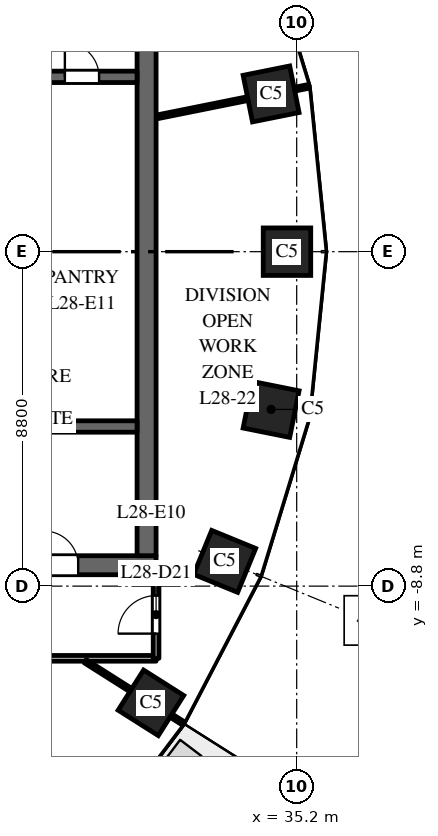
"""IFC4 building model, lengths in metres.
Left out: names, types, materials, properties, quantities, classifications, styles, units other than length and angle.
Written with IfcOpenShell. Run it as: python <this file> out.ifc"""

import sys

from ifc_helpers import new_model, si_unit, direction, frame, frame_2d, origin, origin_2d, place, context, subcontext, project, spatial, rectangle, extrude, element, fill, save


model = new_model("IFC4")
c1 = context("Model", 3, precision=1e-05, world=origin(), true_north=direction((0.0, 1.0)))
c2 = subcontext(c1, "Body", "Model", "MODEL_VIEW")
j1 = project(units=[si_unit("LENGTHUNIT", "METRE"), si_unit("PLANEANGLEUNIT", "RADIAN")], contexts=[c1])
p1 = place(None, origin())
s1 = spatial("IfcSite", under=j1, at=p1, CompositionType="ELEMENT")
p2 = place(p1, origin())
s2 = spatial("IfcBuilding", under=s1, at=p2, CompositionType="ELEMENT")
p3 = place(p2, frame((0.0, 0.0, 124.0)))
s3 = spatial("IfcBuildingStorey", under=s2, at=p3, CompositionType="ELEMENT", Elevation=124.0)
for number, where, z_axis, x_axis in (
    (1, (34.945, 0.0, 0.0), (0.0, 0.0, 1.0), (0.0, 1.0, 0.0)),
    (2, (34.527, 4.151, 0.0), (0.0, 0.0, 1.0), (-0.197, 0.98, 0.0)),
    (3, (31.365, -11.871, 0.0), (0.0, 0.0, 1.0), (0.535, 0.845, 0.0)),
    (4, (33.305, -8.149, 0.0), (0.0, 0.0, 1.0), (0.379, 0.925, 0.0)),
    (5, (34.527, -4.151, 0.0), (0.0, 0.0, 1.0), (0.197, 0.98, 0.0)),
):
    element("IfcColumn", number, at=place(p3, frame(where, z_axis=z_axis, x_axis=x_axis)), inside=s3, PredefinedType="COLUMN", context=c2, shape_type="SweptSolid", body=[
        extrude(rectangle(XDim=1.25, YDim=1.25, at=origin_2d()), origin(), (0.0, 0.0, 1.0), 4.0),
    ])
p4 = place(p3, frame((16.5, -8.25, 0.0), z_axis=(0.0, 0.0, 1.0), x_axis=(1.0, 0.0, 0.0)))
e6 = element("IfcWall", 6, at=p4, inside=s3, PredefinedType="SHEAR", context=c2, shape_type="SweptSolid", body=[
    extrude(rectangle(XDim=15.0, YDim=0.5, at=frame_2d((7.5, 0.0))), origin(), (0.0, 0.0, 1.0), 3.7),
])
p5 = place(p4, frame((6.9, 0.0, 0.0)))
e7 = element("IfcOpeningElement", 7, at=p5, cuts=e6, PredefinedType="OPENING", context=c2, shape_type="SweptSolid", body=[
    extrude(rectangle(XDim=1.2, YDim=2.1, at=frame_2d((0.6, 1.05))), frame((0.0, 0.26, 0.0), z_axis=(0.0, -1.0, 0.0), x_axis=(1.0, 0.0, 0.0)), (0.0, 0.0, 1.0), 0.52),
])
p6 = place(p4, frame((12.05, 0.0, 0.0)))
e8 = element("IfcOpeningElement", 8, at=p6, cuts=e6, PredefinedType="OPENING", context=c2, shape_type="SweptSolid", body=[
    extrude(rectangle(XDim=0.9, YDim=2.1, at=frame_2d((0.45, 1.05))), frame((0.0, 0.26, 0.0), z_axis=(0.0, -1.0, 0.0), x_axis=(1.0, 0.0, 0.0)), (0.0, 0.0, 1.0), 0.52),
])
p7 = place(p3, frame((31.25, -8.0, 0.0), z_axis=(0.0, 0.0, 1.0), x_axis=(0.0, 1.0, 0.0)))
e9 = element("IfcWall", 9, at=p7, inside=s3, PredefinedType="SHEAR", context=c2, shape_type="SweptSolid", body=[
    extrude(rectangle(XDim=16.0, YDim=0.5, at=frame_2d((8.0, 0.0))), origin(), (0.0, 0.0, 1.0), 3.7),
])
p8 = place(p3, frame((24.9, 4.6, 0.0), z_axis=(0.0, 0.0, 1.0), x_axis=(1.0, 0.0, 0.0)))
e10 = element("IfcWall", 10, at=p8, inside=s3, PredefinedType="SHEAR", context=c2, shape_type="SweptSolid", body=[
    extrude(rectangle(XDim=6.1, YDim=0.3, at=frame_2d((3.05, 0.0))), origin(), (0.0, 0.0, 1.0), 3.7),
])
p9 = place(p8, frame((4.2, 0.0, 0.0)))
e11 = element("IfcOpeningElement", 11, at=p9, cuts=e10, PredefinedType="OPENING", context=c2, shape_type="SweptSolid", body=[
    extrude(rectangle(XDim=0.9, YDim=2.1, at=frame_2d((0.45, 1.05))), frame((0.0, 0.16, 0.0), z_axis=(0.0, -1.0, 0.0), x_axis=(1.0, 0.0, 0.0)), (0.0, 0.0, 1.0), 0.32),
])
p10 = place(p3, frame((24.9, -4.6, 0.0), z_axis=(0.0, 0.0, 1.0), x_axis=(1.0, 0.0, 0.0)))
e12 = element("IfcWall", 12, at=p10, inside=s3, PredefinedType="SHEAR", context=c2, shape_type="SweptSolid", body=[
    extrude(rectangle(XDim=6.1, YDim=0.3, at=frame_2d((3.05, 0.0))), origin(), (0.0, 0.0, 1.0), 3.7),
])
p11 = place(p3, frame((16.5, -10.7, 0.0), z_axis=(0.0, 0.0, 1.0), x_axis=(1.0, 0.0, 0.0)))
e13 = element("IfcWall", 13, at=p11, inside=s3, PredefinedType="PARTITIONING", context=c2, shape_type="SweptSolid", body=[
    extrude(rectangle(XDim=15.0, YDim=0.15, at=frame_2d((7.5, 0.0))), origin(), (0.0, 0.0, 1.0), 2.75),
])
p12 = place(p11, frame((8.65, 0.0, 0.0)))
e14 = element("IfcOpeningElement", 14, at=p12, cuts=e13, PredefinedType="OPENING", context=c2, shape_type="SweptSolid", body=[
    extrude(rectangle(XDim=1.0, YDim=2.1, at=frame_2d((0.5, 1.05))), frame((0.0, 0.085, 0.0), z_axis=(0.0, -1.0, 0.0), x_axis=(1.0, 0.0, 0.0)), (0.0, 0.0, 1.0), 0.17),
])
p13 = place(p3, frame((29.637, -10.777, 0.0), z_axis=(0.0, 0.0, 1.0), x_axis=(0.844810627195, -0.535065420467, 0.0)))
e15 = element("IfcWall", 15, at=p13, inside=s3, PredefinedType="PARTITIONING", context=c2, shape_type="SweptSolid", body=[
    extrude(rectangle(XDim=3.048, YDim=0.1, at=frame_2d((1.524, 0.0))), origin(), (0.0, 0.0, 1.0), 2.9),
])
p14 = place(p3, frame((31.5, -10.7, 0.0), z_axis=(0.0, 0.0, 1.0), x_axis=(0.0, 1.0, 0.0)))
e16 = element("IfcWall", 16, at=p14, inside=s3, PredefinedType="PARTITIONING", context=c2, shape_type="SweptSolid", body=[
    extrude(rectangle(XDim=2.2, YDim=0.15, at=frame_2d((1.1, 0.0))), origin(), (0.0, 0.0, 1.0), 2.9),
])
p15 = place(p14, frame((0.65, 0.0, 0.0)))
e17 = element("IfcOpeningElement", 17, at=p15, cuts=e16, PredefinedType="OPENING", context=c2, shape_type="SweptSolid", body=[
    extrude(rectangle(XDim=1.0, YDim=2.1, at=frame_2d((0.5, 1.05))), frame((0.0, 0.085, 0.0), z_axis=(0.0, -1.0, 0.0), x_axis=(1.0, 0.0, 0.0)), (0.0, 0.0, 1.0), 0.17),
])
p16 = place(p3, frame((31.5, 3.542, 0.0), z_axis=(0.0, 0.0, 1.0), x_axis=(0.980357474535, 0.197228857227, 0.0)))
e18 = element("IfcWall", 18, at=p16, inside=s3, PredefinedType="PARTITIONING", context=c2, shape_type="SweptSolid", body=[
    extrude(rectangle(XDim=4.092, YDim=0.1, at=frame_2d((2.046, 0.0))), origin(), (0.0, 0.0, 1.0), 2.9),
])
p17 = place(p6, origin())
e19 = element("IfcDoor", 19, at=p17, inside=s3, OperationType="SINGLE_SWING_RIGHT", PredefinedType="DOOR", context=c2, shape_type="SweptSolid", body=[
    extrude(rectangle(XDim=0.9, YDim=2.1, at=frame_2d((0.45, 1.05))), frame((0.0, 0.025, 0.0), z_axis=(0.0, -1.0, 0.0), x_axis=(1.0, 0.0, 0.0)), (0.0, 0.0, 1.0), 0.05),
])
fill(e8, e19)
p18 = place(p9, origin())
e20 = element("IfcDoor", 20, at=p18, inside=s3, OperationType="SINGLE_SWING_RIGHT", PredefinedType="DOOR", context=c2, shape_type="SweptSolid", body=[
    extrude(rectangle(XDim=0.9, YDim=2.1, at=frame_2d((0.45, 1.05))), frame((0.0, 0.025, 0.0), z_axis=(0.0, -1.0, 0.0), x_axis=(1.0, 0.0, 0.0)), (0.0, 0.0, 1.0), 0.05),
])
fill(e11, e20)
p19 = place(p15, origin())
e21 = element("IfcDoor", 21, at=p19, inside=s3, OperationType="SINGLE_SWING_LEFT", PredefinedType="DOOR", context=c2, shape_type="SweptSolid", body=[
    extrude(rectangle(XDim=1.0, YDim=2.1, at=frame_2d((0.5, 1.05))), frame((0.0, 0.025, 0.0), z_axis=(0.0, -1.0, 0.0), x_axis=(1.0, 0.0, 0.0)), (0.0, 0.0, 1.0), 0.05),
])
fill(e17, e21)
save(model, sys.argv[1])
